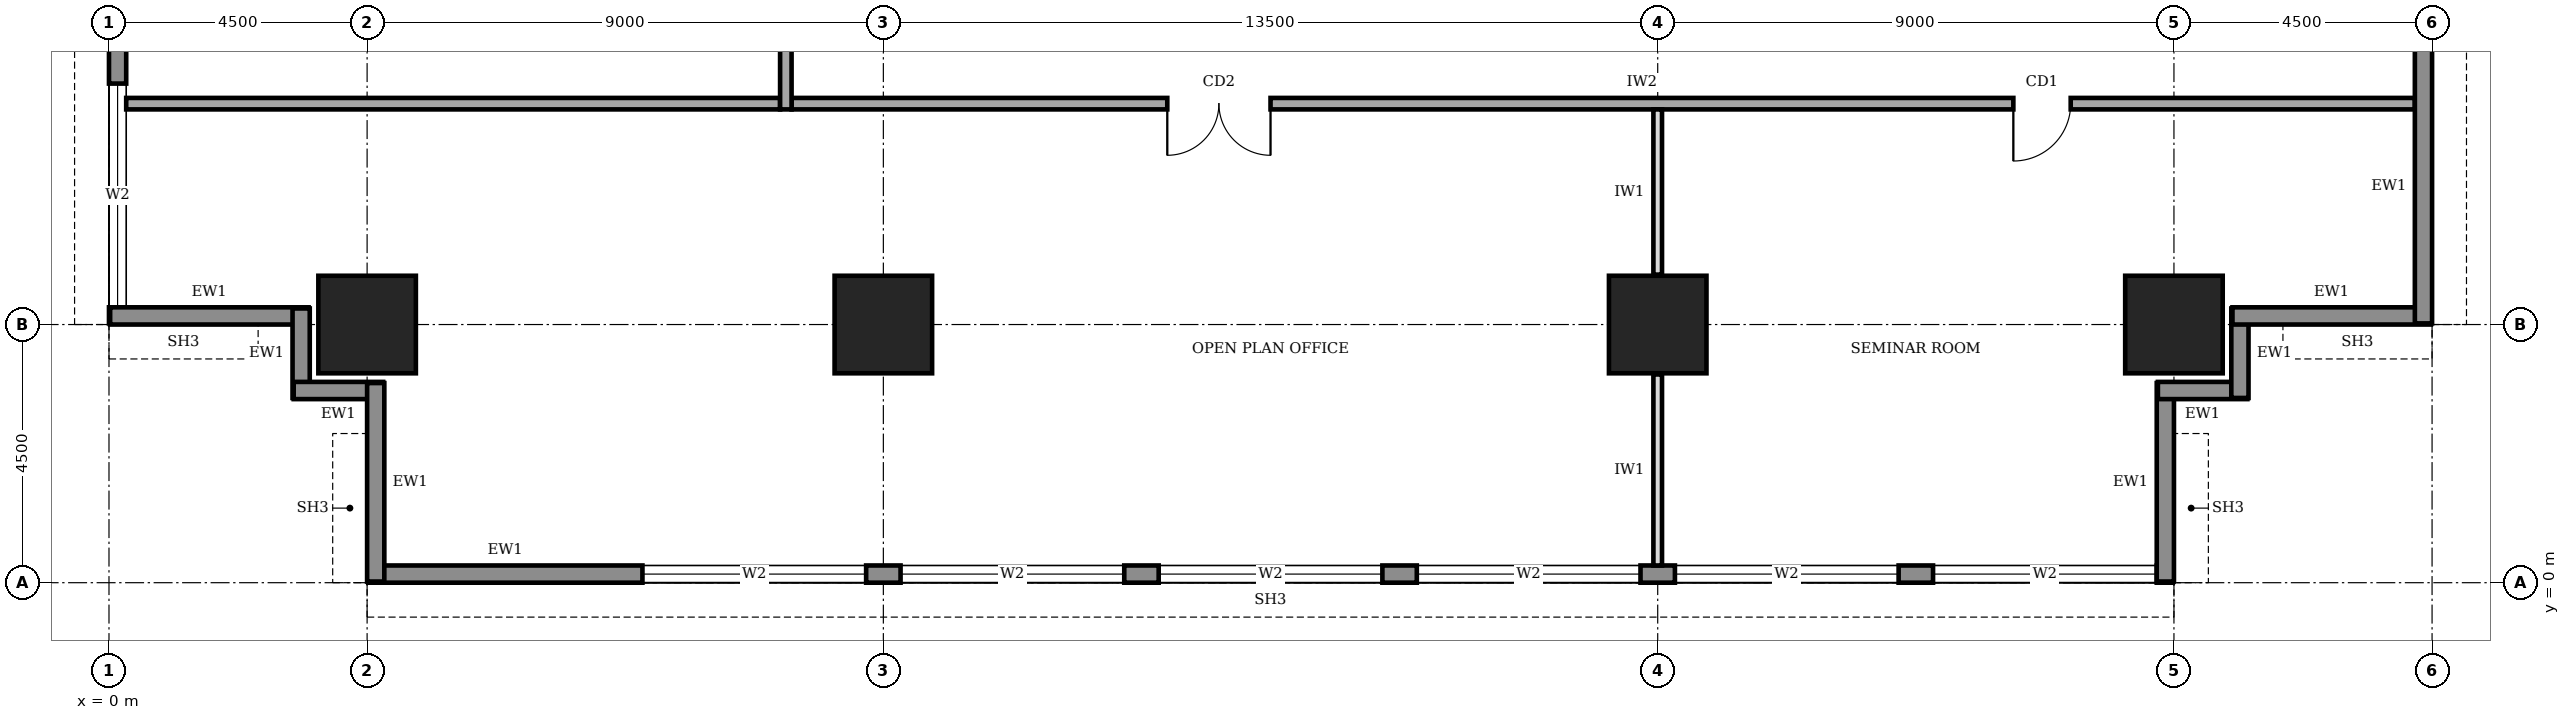
"""IFC4 building model, lengths in metres.
Left out: names, types, materials, properties, quantities, classifications, styles, units other than length and angle.
Written with IfcOpenShell. Run it as: python <this file> out.ifc"""

import sys

from ifc_helpers import new_model, si_unit, direction, frame, frame_2d, origin, origin_2d, place, context, subcontext, project, spatial, rectangle, extrude, element, fill, save


model = new_model("IFC4")
c1 = context("Model", 3, precision=1e-05, world=origin(), true_north=direction((0.0, 1.0)))
c2 = subcontext(c1, "Body", "Model", "MODEL_VIEW")
j1 = project(units=[si_unit("LENGTHUNIT", "METRE"), si_unit("PLANEANGLEUNIT", "RADIAN")], contexts=[c1])
p1 = place(None, origin())
s1 = spatial("IfcSite", under=j1, at=p1, CompositionType="ELEMENT")
p2 = place(p1, origin())
s2 = spatial("IfcBuilding", under=s1, at=p2, CompositionType="ELEMENT")
p3 = place(p2, frame((0.0, 0.0, 165.0)))
s3 = spatial("IfcBuildingStorey", under=s2, at=p3, CompositionType="ELEMENT", Elevation=165.0)
for number, where, z_axis, x_axis in (
    (1, (4.5, 4.5, 0.0), (0.0, 0.0, 1.0), (1.0, 0.0, 0.0)),
    (2, (13.5, 4.5, 0.0), (0.0, 0.0, 1.0), (1.0, 0.0, 0.0)),
    (3, (27.0, 4.5, 0.0), (0.0, 0.0, 1.0), (1.0, 0.0, 0.0)),
    (4, (36.0, 4.5, 0.0), (0.0, 0.0, 1.0), (1.0, 0.0, 0.0)),
):
    element("IfcColumn", number, at=place(p3, frame(where, z_axis=z_axis, x_axis=x_axis)), inside=s3, PredefinedType="COLUMN", context=c2, shape_type="SweptSolid", body=[
        extrude(rectangle(XDim=1.7, YDim=1.7, at=origin_2d()), origin(), (0.0, 0.0, 1.0), 4.0),
    ])
p4 = place(p3, frame((4.52, 0.15, 0.0), z_axis=(0.0, 0.0, 1.0), x_axis=(1.0, 0.0, 0.0)))
e5 = element("IfcWall", 5, at=p4, inside=s3, PredefinedType="STANDARD", context=c2, shape_type="SweptSolid", body=[
    extrude(rectangle(XDim=31.46, YDim=0.3, at=frame_2d((15.73, 0.0))), origin(), (0.0, 0.0, 1.0), 3.75),
])
p5 = place(p4, frame((4.78, 0.0, 0.6)))
e6 = element("IfcOpeningElement", 6, at=p5, cuts=e5, PredefinedType="OPENING", context=c2, shape_type="SweptSolid", body=[
    extrude(rectangle(XDim=3.9, YDim=2.6, at=frame_2d((1.95, 1.3))), frame((0.0, 0.16, 0.0), z_axis=(0.0, -1.0, 0.0), x_axis=(1.0, 0.0, 0.0)), (0.0, 0.0, 1.0), 0.32),
])
p6 = place(p4, frame((9.28, 0.0, 0.6)))
e7 = element("IfcOpeningElement", 7, at=p6, cuts=e5, PredefinedType="OPENING", context=c2, shape_type="SweptSolid", body=[
    extrude(rectangle(XDim=3.9, YDim=2.6, at=frame_2d((1.95, 1.3))), frame((0.0, 0.16, 0.0), z_axis=(0.0, -1.0, 0.0), x_axis=(1.0, 0.0, 0.0)), (0.0, 0.0, 1.0), 0.32),
])
p7 = place(p4, frame((13.78, 0.0, 0.6)))
e8 = element("IfcOpeningElement", 8, at=p7, cuts=e5, PredefinedType="OPENING", context=c2, shape_type="SweptSolid", body=[
    extrude(rectangle(XDim=3.9, YDim=2.6, at=frame_2d((1.95, 1.3))), frame((0.0, 0.16, 0.0), z_axis=(0.0, -1.0, 0.0), x_axis=(1.0, 0.0, 0.0)), (0.0, 0.0, 1.0), 0.32),
])
p8 = place(p4, frame((18.28, 0.0, 0.6)))
e9 = element("IfcOpeningElement", 9, at=p8, cuts=e5, PredefinedType="OPENING", context=c2, shape_type="SweptSolid", body=[
    extrude(rectangle(XDim=3.9, YDim=2.6, at=frame_2d((1.95, 1.3))), frame((0.0, 0.16, 0.0), z_axis=(0.0, -1.0, 0.0), x_axis=(1.0, 0.0, 0.0)), (0.0, 0.0, 1.0), 0.32),
])
p9 = place(p4, frame((22.78, 0.0, 0.6)))
e10 = element("IfcOpeningElement", 10, at=p9, cuts=e5, PredefinedType="OPENING", context=c2, shape_type="SweptSolid", body=[
    extrude(rectangle(XDim=3.9, YDim=2.6, at=frame_2d((1.95, 1.3))), frame((0.0, 0.16, 0.0), z_axis=(0.0, -1.0, 0.0), x_axis=(1.0, 0.0, 0.0)), (0.0, 0.0, 1.0), 0.32),
])
p10 = place(p4, frame((27.28, 0.0, 0.6)))
e11 = element("IfcOpeningElement", 11, at=p10, cuts=e5, PredefinedType="OPENING", context=c2, shape_type="SweptSolid", body=[
    extrude(rectangle(XDim=3.9, YDim=2.6, at=frame_2d((1.95, 1.3))), frame((0.0, 0.16, 0.0), z_axis=(0.0, -1.0, 0.0), x_axis=(1.0, 0.0, 0.0)), (0.0, 0.0, 1.0), 0.32),
])
p11 = place(p3, frame((35.85, 0.02, 0.0), z_axis=(0.0, 0.0, 1.0), x_axis=(0.0, 1.0, 0.0)))
e12 = element("IfcWall", 12, at=p11, inside=s3, PredefinedType="STANDARD", context=c2, shape_type="SweptSolid", body=[
    extrude(rectangle(XDim=3.46, YDim=0.3, at=frame_2d((1.73, 0.0))), origin(), (0.0, 0.0, 1.0), 2.75),
])
for number, where, z_axis, x_axis in (
    (13, (35.72, 3.35, 0.0), (0.0, 0.0, 1.0), (1.0, 0.0, 0.0)),
    (14, (37.15, 3.22, 0.0), (0.0, 0.0, 1.0), (0.0, 1.0, 0.0)),
):
    element("IfcWall", number, at=place(p3, frame(where, z_axis=z_axis, x_axis=x_axis)), inside=s3, PredefinedType="STANDARD", context=c2, shape_type="SweptSolid", body=[
        extrude(rectangle(XDim=1.56, YDim=0.3, at=frame_2d((0.78, 0.0))), origin(), (0.0, 0.0, 1.0), 3.75),
    ])
p12 = place(p3, frame((37.02, 4.65, 0.0), z_axis=(0.0, 0.0, 1.0), x_axis=(1.0, 0.0, 0.0)))
e15 = element("IfcWall", 15, at=p12, inside=s3, PredefinedType="STANDARD", context=c2, shape_type="SweptSolid", body=[
    extrude(rectangle(XDim=3.46, YDim=0.3, at=frame_2d((1.73, 0.0))), origin(), (0.0, 0.0, 1.0), 2.75),
])
p13 = place(p3, frame((40.35, 4.52, 0.0), z_axis=(0.0, 0.0, 1.0), x_axis=(0.0, 1.0, 0.0)))
e16 = element("IfcWall", 16, at=p13, inside=s3, PredefinedType="STANDARD", context=c2, shape_type="SweptSolid", body=[
    extrude(rectangle(XDim=31.46, YDim=0.3, at=frame_2d((15.73, 0.0))), origin(), (0.0, 0.0, 1.0), 3.75),
])
p14 = place(p13, frame((4.78, 0.0, 0.6)))
e17 = element("IfcOpeningElement", 17, at=p14, cuts=e16, PredefinedType="OPENING", context=c2, shape_type="SweptSolid", body=[
    extrude(rectangle(XDim=3.9, YDim=2.6, at=frame_2d((1.95, 1.3))), frame((0.0, 0.16, 0.0), z_axis=(0.0, -1.0, 0.0), x_axis=(1.0, 0.0, 0.0)), (0.0, 0.0, 1.0), 0.32),
])
p15 = place(p13, frame((9.28, 0.0, 0.6)))
e18 = element("IfcOpeningElement", 18, at=p15, cuts=e16, PredefinedType="OPENING", context=c2, shape_type="SweptSolid", body=[
    extrude(rectangle(XDim=3.9, YDim=2.6, at=frame_2d((1.95, 1.3))), frame((0.0, 0.16, 0.0), z_axis=(0.0, -1.0, 0.0), x_axis=(1.0, 0.0, 0.0)), (0.0, 0.0, 1.0), 0.32),
])
p16 = place(p13, frame((13.78, 0.0, 0.6)))
e19 = element("IfcOpeningElement", 19, at=p16, cuts=e16, PredefinedType="OPENING", context=c2, shape_type="SweptSolid", body=[
    extrude(rectangle(XDim=3.9, YDim=2.6, at=frame_2d((1.95, 1.3))), frame((0.0, 0.16, 0.0), z_axis=(0.0, -1.0, 0.0), x_axis=(1.0, 0.0, 0.0)), (0.0, 0.0, 1.0), 0.32),
])
p17 = place(p13, frame((18.28, 0.0, 0.6)))
e20 = element("IfcOpeningElement", 20, at=p17, cuts=e16, PredefinedType="OPENING", context=c2, shape_type="SweptSolid", body=[
    extrude(rectangle(XDim=3.9, YDim=2.6, at=frame_2d((1.95, 1.3))), frame((0.0, 0.16, 0.0), z_axis=(0.0, -1.0, 0.0), x_axis=(1.0, 0.0, 0.0)), (0.0, 0.0, 1.0), 0.32),
])
p18 = place(p13, frame((22.78, 0.0, 0.6)))
e21 = element("IfcOpeningElement", 21, at=p18, cuts=e16, PredefinedType="OPENING", context=c2, shape_type="SweptSolid", body=[
    extrude(rectangle(XDim=3.9, YDim=2.6, at=frame_2d((1.95, 1.3))), frame((0.0, 0.16, 0.0), z_axis=(0.0, -1.0, 0.0), x_axis=(1.0, 0.0, 0.0)), (0.0, 0.0, 1.0), 0.32),
])
p19 = place(p13, frame((27.28, 0.0, 0.6)))
e22 = element("IfcOpeningElement", 22, at=p19, cuts=e16, PredefinedType="OPENING", context=c2, shape_type="SweptSolid", body=[
    extrude(rectangle(XDim=3.9, YDim=2.6, at=frame_2d((1.95, 1.3))), frame((0.0, 0.16, 0.0), z_axis=(0.0, -1.0, 0.0), x_axis=(1.0, 0.0, 0.0)), (0.0, 0.0, 1.0), 0.32),
])
p20 = place(p3, frame((0.15, 35.98, 0.0), z_axis=(0.0, 0.0, 1.0), x_axis=(0.0, -1.0, 0.0)))
e23 = element("IfcWall", 23, at=p20, inside=s3, PredefinedType="STANDARD", context=c2, shape_type="SweptSolid", body=[
    extrude(rectangle(XDim=31.46, YDim=0.3, at=frame_2d((15.73, 0.0))), origin(), (0.0, 0.0, 1.0), 3.75),
])
p21 = place(p20, frame((27.28, 0.0, 0.6)))
e24 = element("IfcOpeningElement", 24, at=p21, cuts=e23, PredefinedType="OPENING", context=c2, shape_type="SweptSolid", body=[
    extrude(rectangle(XDim=3.9, YDim=2.6, at=frame_2d((1.95, 1.3))), frame((0.0, 0.16, 0.0), z_axis=(0.0, -1.0, 0.0), x_axis=(1.0, 0.0, 0.0)), (0.0, 0.0, 1.0), 0.32),
])
p22 = place(p20, frame((22.78, 0.0, 0.6)))
e25 = element("IfcOpeningElement", 25, at=p22, cuts=e23, PredefinedType="OPENING", context=c2, shape_type="SweptSolid", body=[
    extrude(rectangle(XDim=3.9, YDim=2.6, at=frame_2d((1.95, 1.3))), frame((0.0, 0.16, 0.0), z_axis=(0.0, -1.0, 0.0), x_axis=(1.0, 0.0, 0.0)), (0.0, 0.0, 1.0), 0.32),
])
p23 = place(p20, frame((18.28, 0.0, 0.6)))
e26 = element("IfcOpeningElement", 26, at=p23, cuts=e23, PredefinedType="OPENING", context=c2, shape_type="SweptSolid", body=[
    extrude(rectangle(XDim=3.9, YDim=2.6, at=frame_2d((1.95, 1.3))), frame((0.0, 0.16, 0.0), z_axis=(0.0, -1.0, 0.0), x_axis=(1.0, 0.0, 0.0)), (0.0, 0.0, 1.0), 0.32),
])
p24 = place(p20, frame((13.78, 0.0, 0.6)))
e27 = element("IfcOpeningElement", 27, at=p24, cuts=e23, PredefinedType="OPENING", context=c2, shape_type="SweptSolid", body=[
    extrude(rectangle(XDim=3.9, YDim=2.6, at=frame_2d((1.95, 1.3))), frame((0.0, 0.16, 0.0), z_axis=(0.0, -1.0, 0.0), x_axis=(1.0, 0.0, 0.0)), (0.0, 0.0, 1.0), 0.32),
])
p25 = place(p20, frame((9.28, 0.0, 0.6)))
e28 = element("IfcOpeningElement", 28, at=p25, cuts=e23, PredefinedType="OPENING", context=c2, shape_type="SweptSolid", body=[
    extrude(rectangle(XDim=3.9, YDim=2.6, at=frame_2d((1.95, 1.3))), frame((0.0, 0.16, 0.0), z_axis=(0.0, -1.0, 0.0), x_axis=(1.0, 0.0, 0.0)), (0.0, 0.0, 1.0), 0.32),
])
p26 = place(p20, frame((4.78, 0.0, 0.6)))
e29 = element("IfcOpeningElement", 29, at=p26, cuts=e23, PredefinedType="OPENING", context=c2, shape_type="SweptSolid", body=[
    extrude(rectangle(XDim=3.9, YDim=2.6, at=frame_2d((1.95, 1.3))), frame((0.0, 0.16, 0.0), z_axis=(0.0, -1.0, 0.0), x_axis=(1.0, 0.0, 0.0)), (0.0, 0.0, 1.0), 0.32),
])
p27 = place(p3, frame((0.02, 4.65, 0.0), z_axis=(0.0, 0.0, 1.0), x_axis=(1.0, 0.0, 0.0)))
e30 = element("IfcWall", 30, at=p27, inside=s3, PredefinedType="STANDARD", context=c2, shape_type="SweptSolid", body=[
    extrude(rectangle(XDim=3.46, YDim=0.3, at=frame_2d((1.73, 0.0))), origin(), (0.0, 0.0, 1.0), 2.75),
])
for number, where, z_axis, x_axis in (
    (31, (3.35, 4.78, 0.0), (0.0, 0.0, 1.0), (0.0, -1.0, 0.0)),
    (32, (3.22, 3.35, 0.0), (0.0, 0.0, 1.0), (1.0, 0.0, 0.0)),
):
    element("IfcWall", number, at=place(p3, frame(where, z_axis=z_axis, x_axis=x_axis)), inside=s3, PredefinedType="STANDARD", context=c2, shape_type="SweptSolid", body=[
        extrude(rectangle(XDim=1.56, YDim=0.3, at=frame_2d((0.78, 0.0))), origin(), (0.0, 0.0, 1.0), 3.75),
    ])
p28 = place(p3, frame((4.65, 3.48, 0.0), z_axis=(0.0, 0.0, 1.0), x_axis=(0.0, -1.0, 0.0)))
e33 = element("IfcWall", 33, at=p28, inside=s3, PredefinedType="STANDARD", context=c2, shape_type="SweptSolid", body=[
    extrude(rectangle(XDim=3.46, YDim=0.3, at=frame_2d((1.73, 0.0))), origin(), (0.0, 0.0, 1.0), 2.75),
])
p29 = place(p3, frame((11.9, 8.35, 0.0), z_axis=(0.0, 0.0, 1.0), x_axis=(1.0, 0.0, 0.0)))
e34 = element("IfcWall", 34, at=p29, inside=s3, PredefinedType="SOLIDWALL", context=c2, shape_type="SweptSolid", body=[
    extrude(rectangle(XDim=28.3, YDim=0.2, at=frame_2d((14.15, 0.0))), origin(), (0.0, 0.0, 1.0), 3.75),
])
p30 = place(p29, frame((6.55, 0.0, 0.0)))
e35 = element("IfcOpeningElement", 35, at=p30, cuts=e34, PredefinedType="OPENING", context=c2, shape_type="SweptSolid", body=[
    extrude(rectangle(XDim=1.8, YDim=2.1, at=frame_2d((0.9, 1.05))), frame((0.0, 0.11, 0.0), z_axis=(0.0, -1.0, 0.0), x_axis=(1.0, 0.0, 0.0)), (0.0, 0.0, 1.0), 0.22),
])
p31 = place(p29, frame((21.3, 0.0, 0.0)))
e36 = element("IfcOpeningElement", 36, at=p31, cuts=e34, PredefinedType="OPENING", context=c2, shape_type="SweptSolid", body=[
    extrude(rectangle(XDim=1.0, YDim=2.1, at=frame_2d((0.5, 1.05))), frame((0.0, 0.11, 0.0), z_axis=(0.0, -1.0, 0.0), x_axis=(1.0, 0.0, 0.0)), (0.0, 0.0, 1.0), 0.22),
])
p32 = place(p3, frame((11.8, 32.05, 0.0), z_axis=(0.0, 0.0, 1.0), x_axis=(0.0, -1.0, 0.0)))
e37 = element("IfcWall", 37, at=p32, inside=s3, PredefinedType="SOLIDWALL", context=c2, shape_type="SweptSolid", body=[
    extrude(rectangle(XDim=23.8, YDim=0.2, at=frame_2d((11.9, 0.0))), origin(), (0.0, 0.0, 1.0), 3.75),
])
p33 = place(p32, frame((20.675, 0.0, 0.0)))
e38 = element("IfcOpeningElement", 38, at=p33, cuts=e37, PredefinedType="OPENING", context=c2, shape_type="SweptSolid", body=[
    extrude(rectangle(XDim=1.0, YDim=2.1, at=frame_2d((0.5, 1.05))), frame((0.0, 0.11, 0.0), z_axis=(0.0, -1.0, 0.0), x_axis=(1.0, 0.0, 0.0)), (0.0, 0.0, 1.0), 0.22),
])
p34 = place(p32, frame((16.2, 0.0, 0.0)))
e39 = element("IfcOpeningElement", 39, at=p34, cuts=e37, PredefinedType="OPENING", context=c2, shape_type="SweptSolid", body=[
    extrude(rectangle(XDim=0.9, YDim=2.1, at=frame_2d((0.45, 1.05))), frame((0.0, 0.11, 0.0), z_axis=(0.0, -1.0, 0.0), x_axis=(1.0, 0.0, 0.0)), (0.0, 0.0, 1.0), 0.22),
])
p35 = place(p32, frame((13.2, 0.0, 0.0)))
e40 = element("IfcOpeningElement", 40, at=p35, cuts=e37, PredefinedType="OPENING", context=c2, shape_type="SweptSolid", body=[
    extrude(rectangle(XDim=0.9, YDim=2.1, at=frame_2d((0.45, 1.05))), frame((0.0, 0.11, 0.0), z_axis=(0.0, -1.0, 0.0), x_axis=(1.0, 0.0, 0.0)), (0.0, 0.0, 1.0), 0.22),
])
p36 = place(p32, frame((8.35, 0.0, 0.0)))
e41 = element("IfcOpeningElement", 41, at=p36, cuts=e37, PredefinedType="OPENING", context=c2, shape_type="SweptSolid", body=[
    extrude(rectangle(XDim=0.9, YDim=2.1, at=frame_2d((0.45, 1.05))), frame((0.0, 0.11, 0.0), z_axis=(0.0, -1.0, 0.0), x_axis=(1.0, 0.0, 0.0)), (0.0, 0.0, 1.0), 0.22),
])
p37 = place(p32, frame((5.55, 0.0, 0.0)))
e42 = element("IfcOpeningElement", 42, at=p37, cuts=e37, PredefinedType="OPENING", context=c2, shape_type="SweptSolid", body=[
    extrude(rectangle(XDim=1.0, YDim=2.1, at=frame_2d((0.5, 1.05))), frame((0.0, 0.11, 0.0), z_axis=(0.0, -1.0, 0.0), x_axis=(1.0, 0.0, 0.0)), (0.0, 0.0, 1.0), 0.22),
])
p38 = place(p32, frame((11.05, 0.0, 0.0)))
e43 = element("IfcOpeningElement", 43, at=p38, cuts=e37, PredefinedType="OPENING", context=c2, shape_type="SweptSolid", body=[
    extrude(rectangle(XDim=1.0, YDim=2.1, at=frame_2d((0.5, 1.05))), frame((0.0, 0.11, 0.0), z_axis=(0.0, -1.0, 0.0), x_axis=(1.0, 0.0, 0.0)), (0.0, 0.0, 1.0), 0.22),
])
p39 = place(p32, frame((1.925, 0.0, 0.0)))
e44 = element("IfcOpeningElement", 44, at=p39, cuts=e37, PredefinedType="OPENING", context=c2, shape_type="SweptSolid", body=[
    extrude(rectangle(XDim=1.0, YDim=2.1, at=frame_2d((0.5, 1.05))), frame((0.0, 0.11, 0.0), z_axis=(0.0, -1.0, 0.0), x_axis=(1.0, 0.0, 0.0)), (0.0, 0.0, 1.0), 0.22),
])
p40 = place(p3, frame((0.3, 8.35, 0.0), z_axis=(0.0, 0.0, 1.0), x_axis=(1.0, 0.0, 0.0)))
e45 = element("IfcWall", 45, at=p40, inside=s3, PredefinedType="SOLIDWALL", context=c2, shape_type="SweptSolid", body=[
    extrude(rectangle(XDim=11.4, YDim=0.2, at=frame_2d((5.7, 0.0))), origin(), (0.0, 0.0, 1.0), 3.75),
])
p41 = place(p3, frame((27.0, 0.3, 0.0), z_axis=(0.0, 0.0, 1.0), x_axis=(0.0, 1.0, 0.0)))
e46 = element("IfcWall", 46, at=p41, inside=s3, PredefinedType="PARTITIONING", context=c2, shape_type="SweptSolid", body=[
    extrude(rectangle(XDim=3.33, YDim=0.15, at=frame_2d((1.665, 0.0))), origin(), (0.0, 0.0, 1.0), 2.75),
])
p42 = place(p3, frame((27.0, 5.37, 0.0), z_axis=(0.0, 0.0, 1.0), x_axis=(0.0, 1.0, 0.0)))
e47 = element("IfcWall", 47, at=p42, inside=s3, PredefinedType="PARTITIONING", context=c2, shape_type="SweptSolid", body=[
    extrude(rectangle(XDim=2.88, YDim=0.15, at=frame_2d((1.44, 0.0))), origin(), (0.0, 0.0, 1.0), 3.75),
])
p43 = place(p5, origin())
e48 = element("IfcWindow", 48, at=p43, inside=s3, PartitioningType="SINGLE_PANEL", PredefinedType="WINDOW", context=c2, shape_type="SweptSolid", body=[
    extrude(rectangle(XDim=3.9, YDim=2.6, at=frame_2d((1.95, 1.3))), frame((0.0, 0.03, 0.0), z_axis=(0.0, -1.0, 0.0), x_axis=(1.0, 0.0, 0.0)), (0.0, 0.0, 1.0), 0.06),
])
fill(e6, e48)
p44 = place(p6, origin())
e49 = element("IfcWindow", 49, at=p44, inside=s3, PartitioningType="SINGLE_PANEL", PredefinedType="WINDOW", context=c2, shape_type="SweptSolid", body=[
    extrude(rectangle(XDim=3.9, YDim=2.6, at=frame_2d((1.95, 1.3))), frame((0.0, 0.03, 0.0), z_axis=(0.0, -1.0, 0.0), x_axis=(1.0, 0.0, 0.0)), (0.0, 0.0, 1.0), 0.06),
])
fill(e7, e49)
p45 = place(p7, origin())
e50 = element("IfcWindow", 50, at=p45, inside=s3, PartitioningType="SINGLE_PANEL", PredefinedType="WINDOW", context=c2, shape_type="SweptSolid", body=[
    extrude(rectangle(XDim=3.9, YDim=2.6, at=frame_2d((1.95, 1.3))), frame((0.0, 0.03, 0.0), z_axis=(0.0, -1.0, 0.0), x_axis=(1.0, 0.0, 0.0)), (0.0, 0.0, 1.0), 0.06),
])
fill(e8, e50)
p46 = place(p8, origin())
e51 = element("IfcWindow", 51, at=p46, inside=s3, PartitioningType="SINGLE_PANEL", PredefinedType="WINDOW", context=c2, shape_type="SweptSolid", body=[
    extrude(rectangle(XDim=3.9, YDim=2.6, at=frame_2d((1.95, 1.3))), frame((0.0, 0.03, 0.0), z_axis=(0.0, -1.0, 0.0), x_axis=(1.0, 0.0, 0.0)), (0.0, 0.0, 1.0), 0.06),
])
fill(e9, e51)
p47 = place(p9, origin())
e52 = element("IfcWindow", 52, at=p47, inside=s3, PartitioningType="SINGLE_PANEL", PredefinedType="WINDOW", context=c2, shape_type="SweptSolid", body=[
    extrude(rectangle(XDim=3.9, YDim=2.6, at=frame_2d((1.95, 1.3))), frame((0.0, 0.03, 0.0), z_axis=(0.0, -1.0, 0.0), x_axis=(1.0, 0.0, 0.0)), (0.0, 0.0, 1.0), 0.06),
])
fill(e10, e52)
p48 = place(p10, origin())
e53 = element("IfcWindow", 53, at=p48, inside=s3, PartitioningType="SINGLE_PANEL", PredefinedType="WINDOW", context=c2, shape_type="SweptSolid", body=[
    extrude(rectangle(XDim=3.9, YDim=2.6, at=frame_2d((1.95, 1.3))), frame((0.0, 0.03, 0.0), z_axis=(0.0, -1.0, 0.0), x_axis=(1.0, 0.0, 0.0)), (0.0, 0.0, 1.0), 0.06),
])
fill(e11, e53)
p49 = place(p21, origin())
e54 = element("IfcWindow", 54, at=p49, inside=s3, PartitioningType="SINGLE_PANEL", PredefinedType="WINDOW", context=c2, shape_type="SweptSolid", body=[
    extrude(rectangle(XDim=3.9, YDim=2.6, at=frame_2d((1.95, 1.3))), frame((0.0, 0.03, 0.0), z_axis=(0.0, -1.0, 0.0), x_axis=(1.0, 0.0, 0.0)), (0.0, 0.0, 1.0), 0.06),
])
fill(e24, e54)
p50 = place(p30, frame((1.8, 0.0, 0.0), z_axis=(0.0, 0.0, 1.0), x_axis=(-1.0, 0.0, 0.0)))
e55 = element("IfcDoor", 55, at=p50, inside=s3, OperationType="DOUBLE_DOOR_SINGLE_SWING", PredefinedType="DOOR", context=c2, shape_type="SweptSolid", body=[
    extrude(rectangle(XDim=1.8, YDim=2.1, at=frame_2d((0.9, 1.05))), frame((0.0, 0.025, 0.0), z_axis=(0.0, -1.0, 0.0), x_axis=(1.0, 0.0, 0.0)), (0.0, 0.0, 1.0), 0.05),
])
fill(e35, e55)
p51 = place(p31, frame((1.0, 0.0, 0.0), z_axis=(0.0, 0.0, 1.0), x_axis=(-1.0, 0.0, 0.0)))
e56 = element("IfcDoor", 56, at=p51, inside=s3, OperationType="SINGLE_SWING_RIGHT", PredefinedType="DOOR", context=c2, shape_type="SweptSolid", body=[
    extrude(rectangle(XDim=1.0, YDim=2.1, at=frame_2d((0.5, 1.05))), frame((0.0, 0.025, 0.0), z_axis=(0.0, -1.0, 0.0), x_axis=(1.0, 0.0, 0.0)), (0.0, 0.0, 1.0), 0.05),
])
fill(e36, e56)
save(model, sys.argv[1])
